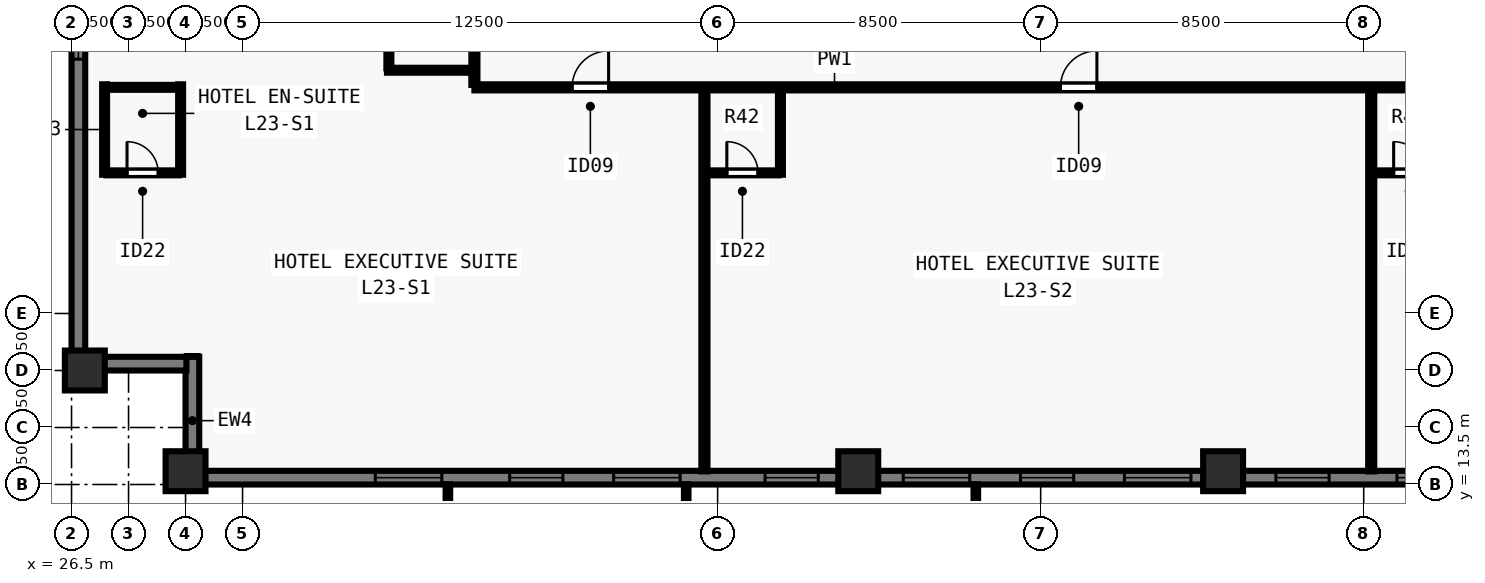
"""IFC4 building model, lengths in metres.
Left out: names, types, materials, properties, quantities, classifications, styles, units other than length and angle.
Written with IfcOpenShell. Run it as: python <this file> out.ifc"""

import sys

from ifc_helpers import new_model, si_unit, direction, frame, frame_2d, origin, origin_2d, place, context, subcontext, project, spatial, rectangle, extrude, element, fill, save


model = new_model("IFC4")
c1 = context("Model", 3, precision=1e-05, world=origin(), true_north=direction((0.0, 1.0)))
c2 = subcontext(c1, "Body", "Model", "MODEL_VIEW")
j1 = project(units=[si_unit("LENGTHUNIT", "METRE"), si_unit("PLANEANGLEUNIT", "RADIAN")], contexts=[c1])
p1 = place(None, origin())
s1 = spatial("IfcSite", under=j1, at=p1, CompositionType="ELEMENT")
p2 = place(p1, origin())
s2 = spatial("IfcBuilding", under=s1, at=p2, CompositionType="ELEMENT")
p3 = place(p2, frame((0.0, 0.0, 86.5)))
s3 = spatial("IfcBuildingStorey", under=s2, at=p3, CompositionType="ELEMENT", Elevation=86.5)
for number, where, z_axis, x_axis in (
    (1, (29.5, 13.85, 0.0), (0.0, 0.0, 1.0), (1.0, 0.0, 0.0)),
    (2, (47.2, 13.85, 0.0), (0.0, 0.0, 1.0), (1.0, 0.0, 0.0)),
    (3, (56.8, 13.85, 0.0), (0.0, 0.0, 1.0), (1.0, 0.0, 0.0)),
    (4, (26.85, 16.5, 0.0), (0.0, 0.0, 1.0), (0.0, 1.0, 0.0)),
):
    element("IfcColumn", number, at=place(p3, frame(where, z_axis=z_axis, x_axis=x_axis)), inside=s3, PredefinedType="COLUMN", context=c2, shape_type="SweptSolid", body=[
        extrude(rectangle(XDim=1.05, YDim=1.05, at=origin_2d()), origin(), (0.0, 0.0, 1.0), 3.5),
    ])
p4 = place(p3, frame((74.5, 13.68, 0.0), z_axis=(0.0, 0.0, 1.0), x_axis=(-1.0, 0.0, 0.0)))
e5 = element("IfcWall", 5, at=p4, inside=s3, PredefinedType="SOLIDWALL", context=c2, shape_type="SweptSolid", body=[
    extrude(rectangle(XDim=44.662, YDim=0.36, at=frame_2d((22.331, 0.0))), origin(), (0.0, 0.0, 1.0), 3.28),
])
p5 = place(p4, frame((4.655, 0.0, 0.8)))
e6 = element("IfcOpeningElement", 6, at=p5, cuts=e5, PredefinedType="OPENING", context=c2, shape_type="SweptSolid", body=[
    extrude(rectangle(XDim=1.75, YDim=1.544, at=frame_2d((0.875, 0.772))), frame((0.0, 0.19, 0.0), z_axis=(0.0, -1.0, 0.0), x_axis=(1.0, 0.0, 0.0)), (0.0, 0.0, 1.0), 0.38),
])
p6 = place(p4, frame((8.19, 0.0, 0.8)))
e7 = element("IfcOpeningElement", 7, at=p6, cuts=e5, PredefinedType="OPENING", context=c2, shape_type="SweptSolid", body=[
    extrude(rectangle(XDim=1.4, YDim=1.544, at=frame_2d((0.7, 0.772))), frame((0.0, 0.19, 0.0), z_axis=(0.0, -1.0, 0.0), x_axis=(1.0, 0.0, 0.0)), (0.0, 0.0, 1.0), 0.38),
])
p7 = place(p4, frame((11.375, 0.0, 0.8)))
e8 = element("IfcOpeningElement", 8, at=p7, cuts=e5, PredefinedType="OPENING", context=c2, shape_type="SweptSolid", body=[
    extrude(rectangle(XDim=1.75, YDim=1.544, at=frame_2d((0.875, 0.772))), frame((0.0, 0.19, 0.0), z_axis=(0.0, -1.0, 0.0), x_axis=(1.0, 0.0, 0.0)), (0.0, 0.0, 1.0), 0.38),
])
p8 = place(p4, frame((14.911, 0.0, 0.8)))
e9 = element("IfcOpeningElement", 9, at=p8, cuts=e5, PredefinedType="OPENING", context=c2, shape_type="SweptSolid", body=[
    extrude(rectangle(XDim=1.4, YDim=1.544, at=frame_2d((0.7, 0.772))), frame((0.0, 0.19, 0.0), z_axis=(0.0, -1.0, 0.0), x_axis=(1.0, 0.0, 0.0)), (0.0, 0.0, 1.0), 0.38),
])
p9 = place(p4, frame((18.546, 0.0, 0.8)))
e10 = element("IfcOpeningElement", 10, at=p9, cuts=e5, PredefinedType="OPENING", context=c2, shape_type="SweptSolid", body=[
    extrude(rectangle(XDim=1.75, YDim=1.544, at=frame_2d((0.875, 0.772))), frame((0.0, 0.19, 0.0), z_axis=(0.0, -1.0, 0.0), x_axis=(1.0, 0.0, 0.0)), (0.0, 0.0, 1.0), 0.38),
])
p10 = place(p4, frame((21.631, 0.0, 0.8)))
e11 = element("IfcOpeningElement", 11, at=p10, cuts=e5, PredefinedType="OPENING", context=c2, shape_type="SweptSolid", body=[
    extrude(rectangle(XDim=1.4, YDim=1.544, at=frame_2d((0.7, 0.772))), frame((0.0, 0.19, 0.0), z_axis=(0.0, -1.0, 0.0), x_axis=(1.0, 0.0, 0.0)), (0.0, 0.0, 1.0), 0.38),
])
p11 = place(p4, frame((24.366, 0.0, 0.8)))
e12 = element("IfcOpeningElement", 12, at=p11, cuts=e5, PredefinedType="OPENING", context=c2, shape_type="SweptSolid", body=[
    extrude(rectangle(XDim=1.75, YDim=1.544, at=frame_2d((0.875, 0.772))), frame((0.0, 0.19, 0.0), z_axis=(0.0, -1.0, 0.0), x_axis=(1.0, 0.0, 0.0)), (0.0, 0.0, 1.0), 0.38),
])
p12 = place(p4, frame((28.351, 0.0, 0.8)))
e13 = element("IfcOpeningElement", 13, at=p12, cuts=e5, PredefinedType="OPENING", context=c2, shape_type="SweptSolid", body=[
    extrude(rectangle(XDim=1.4, YDim=1.544, at=frame_2d((0.7, 0.772))), frame((0.0, 0.19, 0.0), z_axis=(0.0, -1.0, 0.0), x_axis=(1.0, 0.0, 0.0)), (0.0, 0.0, 1.0), 0.38),
])
p13 = place(p4, frame((31.987, 0.0, 0.8)))
e14 = element("IfcOpeningElement", 14, at=p13, cuts=e5, PredefinedType="OPENING", context=c2, shape_type="SweptSolid", body=[
    extrude(rectangle(XDim=1.75, YDim=1.544, at=frame_2d((0.875, 0.772))), frame((0.0, 0.19, 0.0), z_axis=(0.0, -1.0, 0.0), x_axis=(1.0, 0.0, 0.0)), (0.0, 0.0, 1.0), 0.38),
])
p14 = place(p4, frame((35.072, 0.0, 0.8)))
e15 = element("IfcOpeningElement", 15, at=p14, cuts=e5, PredefinedType="OPENING", context=c2, shape_type="SweptSolid", body=[
    extrude(rectangle(XDim=1.4, YDim=1.544, at=frame_2d((0.7, 0.772))), frame((0.0, 0.19, 0.0), z_axis=(0.0, -1.0, 0.0), x_axis=(1.0, 0.0, 0.0)), (0.0, 0.0, 1.0), 0.38),
])
p15 = place(p4, frame((38.257, 0.0, 0.8)))
e16 = element("IfcOpeningElement", 16, at=p15, cuts=e5, PredefinedType="OPENING", context=c2, shape_type="SweptSolid", body=[
    extrude(rectangle(XDim=1.75, YDim=1.544, at=frame_2d((0.875, 0.772))), frame((0.0, 0.19, 0.0), z_axis=(0.0, -1.0, 0.0), x_axis=(1.0, 0.0, 0.0)), (0.0, 0.0, 1.0), 0.38),
])
p16 = place(p3, frame((29.68, 13.5, 0.0), z_axis=(0.0, 0.0, 1.0), x_axis=(0.0, 1.0, 0.0)))
e17 = element("IfcWall", 17, at=p16, inside=s3, PredefinedType="SOLIDWALL", context=c2, shape_type="SweptSolid", body=[
    extrude(rectangle(XDim=3.36, YDim=0.36, at=frame_2d((1.68, 0.0))), origin(), (0.0, 0.0, 1.0), 3.28),
])
p17 = place(p3, frame((29.522, 16.68, 0.0), z_axis=(0.0, 0.0, 1.0), x_axis=(-1.0, 0.0, 0.0)))
e18 = element("IfcWall", 18, at=p17, inside=s3, PredefinedType="SOLIDWALL", context=c2, shape_type="SweptSolid", body=[
    extrude(rectangle(XDim=2.684, YDim=0.36, at=frame_2d((1.342, 0.0))), origin(), (0.0, 0.0, 1.0), 3.28),
])
p18 = place(p3, frame((26.68, 16.5, 0.0), z_axis=(0.0, 0.0, 1.0), x_axis=(0.0, 1.0, 0.0)))
e19 = element("IfcWall", 19, at=p18, inside=s3, PredefinedType="SOLIDWALL", context=c2, shape_type="SweptSolid", body=[
    extrude(rectangle(XDim=44.662, YDim=0.36, at=frame_2d((22.331, 0.0))), origin(), (0.0, 0.0, 1.0), 3.28),
])
p19 = place(p18, frame((8.19, 0.0, 0.8)))
e20 = element("IfcOpeningElement", 20, at=p19, cuts=e19, PredefinedType="OPENING", context=c2, shape_type="SweptSolid", body=[
    extrude(rectangle(XDim=1.4, YDim=1.544, at=frame_2d((0.7, 0.772))), frame((0.0, 0.19, 0.0), z_axis=(0.0, -1.0, 0.0), x_axis=(1.0, 0.0, 0.0)), (0.0, 0.0, 1.0), 0.38),
])
p20 = place(p18, frame((11.375, 0.0, 0.8)))
e21 = element("IfcOpeningElement", 21, at=p20, cuts=e19, PredefinedType="OPENING", context=c2, shape_type="SweptSolid", body=[
    extrude(rectangle(XDim=1.75, YDim=1.544, at=frame_2d((0.875, 0.772))), frame((0.0, 0.19, 0.0), z_axis=(0.0, -1.0, 0.0), x_axis=(1.0, 0.0, 0.0)), (0.0, 0.0, 1.0), 0.38),
])
p21 = place(p18, frame((14.911, 0.0, 0.8)))
e22 = element("IfcOpeningElement", 22, at=p21, cuts=e19, PredefinedType="OPENING", context=c2, shape_type="SweptSolid", body=[
    extrude(rectangle(XDim=1.4, YDim=1.544, at=frame_2d((0.7, 0.772))), frame((0.0, 0.19, 0.0), z_axis=(0.0, -1.0, 0.0), x_axis=(1.0, 0.0, 0.0)), (0.0, 0.0, 1.0), 0.38),
])
p22 = place(p18, frame((18.546, 0.0, 0.8)))
e23 = element("IfcOpeningElement", 23, at=p22, cuts=e19, PredefinedType="OPENING", context=c2, shape_type="SweptSolid", body=[
    extrude(rectangle(XDim=1.75, YDim=1.544, at=frame_2d((0.875, 0.772))), frame((0.0, 0.19, 0.0), z_axis=(0.0, -1.0, 0.0), x_axis=(1.0, 0.0, 0.0)), (0.0, 0.0, 1.0), 0.38),
])
p23 = place(p18, frame((22.881, 0.0, 0.8)))
e24 = element("IfcOpeningElement", 24, at=p23, cuts=e19, PredefinedType="OPENING", context=c2, shape_type="SweptSolid", body=[
    extrude(rectangle(XDim=1.4, YDim=1.544, at=frame_2d((0.7, 0.772))), frame((0.0, 0.19, 0.0), z_axis=(0.0, -1.0, 0.0), x_axis=(1.0, 0.0, 0.0)), (0.0, 0.0, 1.0), 0.38),
])
p24 = place(p18, frame((28.351, 0.0, 0.8)))
e25 = element("IfcOpeningElement", 25, at=p24, cuts=e19, PredefinedType="OPENING", context=c2, shape_type="SweptSolid", body=[
    extrude(rectangle(XDim=1.4, YDim=1.544, at=frame_2d((0.7, 0.772))), frame((0.0, 0.19, 0.0), z_axis=(0.0, -1.0, 0.0), x_axis=(1.0, 0.0, 0.0)), (0.0, 0.0, 1.0), 0.38),
])
p25 = place(p18, frame((31.537, 0.0, 0.8)))
e26 = element("IfcOpeningElement", 26, at=p25, cuts=e19, PredefinedType="OPENING", context=c2, shape_type="SweptSolid", body=[
    extrude(rectangle(XDim=1.75, YDim=1.544, at=frame_2d((0.875, 0.772))), frame((0.0, 0.19, 0.0), z_axis=(0.0, -1.0, 0.0), x_axis=(1.0, 0.0, 0.0)), (0.0, 0.0, 1.0), 0.38),
])
p26 = place(p18, frame((35.072, 0.0, 0.8)))
e27 = element("IfcOpeningElement", 27, at=p26, cuts=e19, PredefinedType="OPENING", context=c2, shape_type="SweptSolid", body=[
    extrude(rectangle(XDim=1.4, YDim=1.544, at=frame_2d((0.7, 0.772))), frame((0.0, 0.19, 0.0), z_axis=(0.0, -1.0, 0.0), x_axis=(1.0, 0.0, 0.0)), (0.0, 0.0, 1.0), 0.38),
])
p27 = place(p3, frame((37.1, 23.95, 0.0), z_axis=(0.0, 0.0, 1.0), x_axis=(1.0, 0.0, 0.0)))
e28 = element("IfcWall", 28, at=p27, inside=s3, PredefinedType="PARTITIONING", context=c2, shape_type="SweptSolid", body=[
    extrude(rectangle(XDim=29.8, YDim=0.16, at=frame_2d((14.9, 0.0))), origin(), (0.0, 0.0, 1.0), 3.28),
])
p28 = place(p27, frame((2.571, 0.0, 0.0)))
e29 = element("IfcOpeningElement", 29, at=p28, cuts=e28, PredefinedType="OPENING", context=c2, shape_type="SweptSolid", body=[
    extrude(rectangle(XDim=0.96, YDim=2.15, at=frame_2d((0.48, 1.075))), frame((0.0, 0.09, 0.0), z_axis=(0.0, -1.0, 0.0), x_axis=(1.0, 0.0, 0.0)), (0.0, 0.0, 1.0), 0.18),
])
p29 = place(p27, frame((15.42, 0.0, 0.0)))
e30 = element("IfcOpeningElement", 30, at=p29, cuts=e28, PredefinedType="OPENING", context=c2, shape_type="SweptSolid", body=[
    extrude(rectangle(XDim=0.96, YDim=2.15, at=frame_2d((0.48, 1.075))), frame((0.0, 0.09, 0.0), z_axis=(0.0, -1.0, 0.0), x_axis=(1.0, 0.0, 0.0)), (0.0, 0.0, 1.0), 0.18),
])
p30 = place(p27, frame((27.269, 0.0, 0.0)))
e31 = element("IfcOpeningElement", 31, at=p30, cuts=e28, PredefinedType="OPENING", context=c2, shape_type="SweptSolid", body=[
    extrude(rectangle(XDim=0.96, YDim=2.15, at=frame_2d((0.48, 1.075))), frame((0.0, 0.09, 0.0), z_axis=(0.0, -1.0, 0.0), x_axis=(1.0, 0.0, 0.0)), (0.0, 0.0, 1.0), 0.18),
])
p31 = place(p3, frame((37.1, 24.015, 0.0), z_axis=(0.0, 0.0, 1.0), x_axis=(0.0, 1.0, 0.0)))
e32 = element("IfcWall", 32, at=p31, inside=s3, PredefinedType="PARTITIONING", context=c2, shape_type="SweptSolid", body=[
    extrude(rectangle(XDim=29.97, YDim=0.16, at=frame_2d((14.985, 0.0))), origin(), (0.0, 0.0, 1.0), 3.28),
])
p32 = place(p31, frame((8.134, 0.0, 0.0)))
e33 = element("IfcOpeningElement", 33, at=p32, cuts=e32, PredefinedType="OPENING", context=c2, shape_type="SweptSolid", body=[
    extrude(rectangle(XDim=0.96, YDim=2.15, at=frame_2d((0.48, 1.075))), frame((0.0, 0.09, 0.0), z_axis=(0.0, -1.0, 0.0), x_axis=(1.0, 0.0, 0.0)), (0.0, 0.0, 1.0), 0.18),
])
p33 = place(p31, frame((22.934, 0.0, 0.0)))
e34 = element("IfcOpeningElement", 34, at=p33, cuts=e32, PredefinedType="OPENING", context=c2, shape_type="SweptSolid", body=[
    extrude(rectangle(XDim=0.96, YDim=2.15, at=frame_2d((0.48, 1.075))), frame((0.0, 0.09, 0.0), z_axis=(0.0, -1.0, 0.0), x_axis=(1.0, 0.0, 0.0)), (0.0, 0.0, 1.0), 0.18),
])
for number, where, z_axis, x_axis in (
    (35, (27.37, 21.65, 0.0), (0.0, 0.0, 1.0), (0.0, 1.0, 0.0)),
    (36, (29.37, 21.65, 0.0), (0.0, 0.0, 1.0), (0.0, 1.0, 0.0)),
):
    element("IfcWall", number, at=place(p3, frame(where, z_axis=z_axis, x_axis=x_axis)), inside=s3, PredefinedType="PLUMBINGWALL", context=c2, shape_type="SweptSolid", body=[
        extrude(rectangle(XDim=2.38, YDim=0.13, at=frame_2d((1.19, 0.0))), origin(), (0.0, 0.0, 1.0), 3.28),
    ])
p34 = place(p3, frame((27.42, 21.7, 0.0), z_axis=(0.0, 0.0, 1.0), x_axis=(1.0, 0.0, 0.0)))
e37 = element("IfcWall", 37, at=p34, inside=s3, PredefinedType="PLUMBINGWALL", context=c2, shape_type="SweptSolid", body=[
    extrude(rectangle(XDim=1.9, YDim=0.13, at=frame_2d((0.95, 0.0))), origin(), (0.0, 0.0, 1.0), 3.28),
])
p35 = place(p34, frame((0.54, 0.0, 0.0)))
e38 = element("IfcOpeningElement", 38, at=p35, cuts=e37, PredefinedType="OPENING", context=c2, shape_type="SweptSolid", body=[
    extrude(rectangle(XDim=0.82, YDim=2.1, at=frame_2d((0.41, 1.05))), frame((0.0, 0.075, 0.0), z_axis=(0.0, -1.0, 0.0), x_axis=(1.0, 0.0, 0.0)), (0.0, 0.0, 1.0), 0.15),
])
p36 = place(p3, frame((27.42, 23.95, 0.0), z_axis=(0.0, 0.0, 1.0), x_axis=(1.0, 0.0, 0.0)))
e39 = element("IfcWall", 39, at=p36, inside=s3, PredefinedType="PLUMBINGWALL", context=c2, shape_type="SweptSolid", body=[
    extrude(rectangle(XDim=1.9, YDim=0.13, at=frame_2d((0.95, 0.0))), origin(), (0.0, 0.0, 1.0), 3.28),
])
p37 = place(p3, frame((43.153, 13.845, 0.0), z_axis=(0.0, 0.0, 1.0), x_axis=(0.0, 1.0, 0.0)))
e40 = element("IfcWall", 40, at=p37, inside=s3, PredefinedType="PARTITIONING", context=c2, shape_type="SweptSolid", body=[
    extrude(rectangle(XDim=10.04, YDim=0.16, at=frame_2d((5.02, 0.0))), origin(), (0.0, 0.0, 1.0), 3.28),
])
p38 = place(p3, frame((45.153, 21.65, 0.0), z_axis=(0.0, 0.0, 1.0), x_axis=(0.0, 1.0, 0.0)))
e41 = element("IfcWall", 41, at=p38, inside=s3, PredefinedType="PLUMBINGWALL", context=c2, shape_type="SweptSolid", body=[
    extrude(rectangle(XDim=2.235, YDim=0.13, at=frame_2d((1.118, 0.0))), origin(), (0.0, 0.0, 1.0), 3.28),
])
p39 = place(p3, frame((43.218, 21.7, 0.0), z_axis=(0.0, 0.0, 1.0), x_axis=(1.0, 0.0, 0.0)))
e42 = element("IfcWall", 42, at=p39, inside=s3, PredefinedType="PLUMBINGWALL", context=c2, shape_type="SweptSolid", body=[
    extrude(rectangle(XDim=1.885, YDim=0.13, at=frame_2d((0.942, 0.0))), origin(), (0.0, 0.0, 1.0), 3.28),
])
p40 = place(p39, frame((0.525, 0.0, 0.0)))
e43 = element("IfcOpeningElement", 43, at=p40, cuts=e42, PredefinedType="OPENING", context=c2, shape_type="SweptSolid", body=[
    extrude(rectangle(XDim=0.82, YDim=2.1, at=frame_2d((0.41, 1.05))), frame((0.0, 0.075, 0.0), z_axis=(0.0, -1.0, 0.0), x_axis=(1.0, 0.0, 0.0)), (0.0, 0.0, 1.0), 0.15),
])
p41 = place(p3, frame((60.698, 13.845, 0.0), z_axis=(0.0, 0.0, 1.0), x_axis=(0.0, 1.0, 0.0)))
e44 = element("IfcWall", 44, at=p41, inside=s3, PredefinedType="PARTITIONING", context=c2, shape_type="SweptSolid", body=[
    extrude(rectangle(XDim=10.04, YDim=0.16, at=frame_2d((5.02, 0.0))), origin(), (0.0, 0.0, 1.0), 3.28),
])
p42 = place(p3, frame((60.762, 21.7, 0.0), z_axis=(0.0, 0.0, 1.0), x_axis=(1.0, 0.0, 0.0)))
e45 = element("IfcWall", 45, at=p42, inside=s3, PredefinedType="PLUMBINGWALL", context=c2, shape_type="SweptSolid", body=[
    extrude(rectangle(XDim=1.885, YDim=0.13, at=frame_2d((0.942, 0.0))), origin(), (0.0, 0.0, 1.0), 3.28),
])
p43 = place(p42, frame((0.525, 0.0, 0.0)))
e46 = element("IfcOpeningElement", 46, at=p43, cuts=e45, PredefinedType="OPENING", context=c2, shape_type="SweptSolid", body=[
    extrude(rectangle(XDim=0.82, YDim=2.1, at=frame_2d((0.41, 1.05))), frame((0.0, 0.075, 0.0), z_axis=(0.0, -1.0, 0.0), x_axis=(1.0, 0.0, 0.0)), (0.0, 0.0, 1.0), 0.15),
])
p44 = place(p3, frame((34.8, 24.4, 0.0), z_axis=(0.0, 0.0, 1.0), x_axis=(1.0, 0.0, 0.0)))
e47 = element("IfcWall", 47, at=p44, inside=s3, PredefinedType="PLUMBINGWALL", context=c2, shape_type="SweptSolid", body=[
    extrude(rectangle(XDim=2.235, YDim=0.13, at=frame_2d((1.117, 0.0))), origin(), (0.0, 0.0, 1.0), 2.849),
])
p45 = place(p3, frame((34.85, 24.45, 0.0), z_axis=(0.0, 0.0, 1.0), x_axis=(0.0, 1.0, 0.0)))
e48 = element("IfcWall", 48, at=p45, inside=s3, PredefinedType="PLUMBINGWALL", context=c2, shape_type="SweptSolid", body=[
    extrude(rectangle(XDim=1.9, YDim=0.13, at=frame_2d((0.95, 0.0))), origin(), (0.0, 0.0, 1.0), 3.28),
])
p46 = place(p45, frame((0.54, 0.0, 0.0)))
e49 = element("IfcOpeningElement", 49, at=p46, cuts=e48, PredefinedType="OPENING", context=c2, shape_type="SweptSolid", body=[
    extrude(rectangle(XDim=0.82, YDim=2.1, at=frame_2d((0.41, 1.05))), frame((0.0, 0.075, 0.0), z_axis=(0.0, -1.0, 0.0), x_axis=(1.0, 0.0, 0.0)), (0.0, 0.0, 1.0), 0.15),
])
p47 = place(p7, origin())
e50 = element("IfcWindow", 50, at=p47, inside=s3, PartitioningType="SINGLE_PANEL", PredefinedType="WINDOW", context=c2, shape_type="SweptSolid", body=[
    extrude(rectangle(XDim=1.75, YDim=1.544, at=frame_2d((0.875, 0.772))), frame((0.0, -0.05, 0.0), z_axis=(0.0, -1.0, 0.0), x_axis=(1.0, 0.0, 0.0)), (0.0, 0.0, 1.0), 0.06),
])
fill(e8, e50)
p48 = place(p8, origin())
e51 = element("IfcWindow", 51, at=p48, inside=s3, PartitioningType="SINGLE_PANEL", PredefinedType="WINDOW", context=c2, shape_type="SweptSolid", body=[
    extrude(rectangle(XDim=1.4, YDim=1.544, at=frame_2d((0.7, 0.772))), frame((0.0, -0.05, 0.0), z_axis=(0.0, -1.0, 0.0), x_axis=(1.0, 0.0, 0.0)), (0.0, 0.0, 1.0), 0.06),
])
fill(e9, e51)
p49 = place(p9, origin())
e52 = element("IfcWindow", 52, at=p49, inside=s3, PartitioningType="SINGLE_PANEL", PredefinedType="WINDOW", context=c2, shape_type="SweptSolid", body=[
    extrude(rectangle(XDim=1.75, YDim=1.544, at=frame_2d((0.875, 0.772))), frame((0.0, -0.05, 0.0), z_axis=(0.0, -1.0, 0.0), x_axis=(1.0, 0.0, 0.0)), (0.0, 0.0, 1.0), 0.06),
])
fill(e10, e52)
p50 = place(p10, origin())
e53 = element("IfcWindow", 53, at=p50, inside=s3, PartitioningType="SINGLE_PANEL", PredefinedType="WINDOW", context=c2, shape_type="SweptSolid", body=[
    extrude(rectangle(XDim=1.4, YDim=1.544, at=frame_2d((0.7, 0.772))), frame((0.0, -0.05, 0.0), z_axis=(0.0, -1.0, 0.0), x_axis=(1.0, 0.0, 0.0)), (0.0, 0.0, 1.0), 0.06),
])
fill(e11, e53)
p51 = place(p11, origin())
e54 = element("IfcWindow", 54, at=p51, inside=s3, PartitioningType="SINGLE_PANEL", PredefinedType="WINDOW", context=c2, shape_type="SweptSolid", body=[
    extrude(rectangle(XDim=1.75, YDim=1.544, at=frame_2d((0.875, 0.772))), frame((0.0, -0.05, 0.0), z_axis=(0.0, -1.0, 0.0), x_axis=(1.0, 0.0, 0.0)), (0.0, 0.0, 1.0), 0.06),
])
fill(e12, e54)
p52 = place(p12, origin())
e55 = element("IfcWindow", 55, at=p52, inside=s3, PartitioningType="SINGLE_PANEL", PredefinedType="WINDOW", context=c2, shape_type="SweptSolid", body=[
    extrude(rectangle(XDim=1.4, YDim=1.544, at=frame_2d((0.7, 0.772))), frame((0.0, -0.05, 0.0), z_axis=(0.0, -1.0, 0.0), x_axis=(1.0, 0.0, 0.0)), (0.0, 0.0, 1.0), 0.06),
])
fill(e13, e55)
p53 = place(p13, origin())
e56 = element("IfcWindow", 56, at=p53, inside=s3, PartitioningType="SINGLE_PANEL", PredefinedType="WINDOW", context=c2, shape_type="SweptSolid", body=[
    extrude(rectangle(XDim=1.75, YDim=1.544, at=frame_2d((0.875, 0.772))), frame((0.0, -0.05, 0.0), z_axis=(0.0, -1.0, 0.0), x_axis=(1.0, 0.0, 0.0)), (0.0, 0.0, 1.0), 0.06),
])
fill(e14, e56)
p54 = place(p14, origin())
e57 = element("IfcWindow", 57, at=p54, inside=s3, PartitioningType="SINGLE_PANEL", PredefinedType="WINDOW", context=c2, shape_type="SweptSolid", body=[
    extrude(rectangle(XDim=1.4, YDim=1.544, at=frame_2d((0.7, 0.772))), frame((0.0, -0.05, 0.0), z_axis=(0.0, -1.0, 0.0), x_axis=(1.0, 0.0, 0.0)), (0.0, 0.0, 1.0), 0.06),
])
fill(e15, e57)
p55 = place(p15, origin())
e58 = element("IfcWindow", 58, at=p55, inside=s3, PartitioningType="SINGLE_PANEL", PredefinedType="WINDOW", context=c2, shape_type="SweptSolid", body=[
    extrude(rectangle(XDim=1.75, YDim=1.544, at=frame_2d((0.875, 0.772))), frame((0.0, -0.05, 0.0), z_axis=(0.0, -1.0, 0.0), x_axis=(1.0, 0.0, 0.0)), (0.0, 0.0, 1.0), 0.06),
])
fill(e16, e58)
p56 = place(p19, origin())
e59 = element("IfcWindow", 59, at=p56, inside=s3, PartitioningType="SINGLE_PANEL", PredefinedType="WINDOW", context=c2, shape_type="SweptSolid", body=[
    extrude(rectangle(XDim=1.4, YDim=1.544, at=frame_2d((0.7, 0.772))), frame((0.0, -0.05, 0.0), z_axis=(0.0, -1.0, 0.0), x_axis=(1.0, 0.0, 0.0)), (0.0, 0.0, 1.0), 0.06),
])
fill(e20, e59)
p57 = place(p35, origin())
e60 = element("IfcDoor", 60, at=p57, inside=s3, OperationType="SINGLE_SWING_LEFT", PredefinedType="DOOR", context=c2, shape_type="SweptSolid", body=[
    extrude(rectangle(XDim=0.82, YDim=2.1, at=frame_2d((0.41, 1.05))), frame((0.0, 0.025, 0.0), z_axis=(0.0, -1.0, 0.0), x_axis=(1.0, 0.0, 0.0)), (0.0, 0.0, 1.0), 0.05),
])
fill(e38, e60)
p58 = place(p28, origin())
e61 = element("IfcDoor", 61, at=p58, inside=s3, OperationType="SINGLE_SWING_RIGHT", PredefinedType="DOOR", context=c2, shape_type="SweptSolid", body=[
    extrude(rectangle(XDim=0.96, YDim=2.15, at=frame_2d((0.48, 1.075))), frame((0.0, 0.025, 0.0), z_axis=(0.0, -1.0, 0.0), x_axis=(1.0, 0.0, 0.0)), (0.0, 0.0, 1.0), 0.05),
])
fill(e29, e61)
p59 = place(p40, origin())
e62 = element("IfcDoor", 62, at=p59, inside=s3, OperationType="SINGLE_SWING_LEFT", PredefinedType="DOOR", context=c2, shape_type="SweptSolid", body=[
    extrude(rectangle(XDim=0.82, YDim=2.1, at=frame_2d((0.41, 1.05))), frame((0.0, 0.025, 0.0), z_axis=(0.0, -1.0, 0.0), x_axis=(1.0, 0.0, 0.0)), (0.0, 0.0, 1.0), 0.05),
])
fill(e43, e62)
p60 = place(p29, origin())
e63 = element("IfcDoor", 63, at=p60, inside=s3, OperationType="SINGLE_SWING_RIGHT", PredefinedType="DOOR", context=c2, shape_type="SweptSolid", body=[
    extrude(rectangle(XDim=0.96, YDim=2.15, at=frame_2d((0.48, 1.075))), frame((0.0, 0.025, 0.0), z_axis=(0.0, -1.0, 0.0), x_axis=(1.0, 0.0, 0.0)), (0.0, 0.0, 1.0), 0.05),
])
fill(e30, e63)
p61 = place(p43, origin())
e64 = element("IfcDoor", 64, at=p61, inside=s3, OperationType="SINGLE_SWING_LEFT", PredefinedType="DOOR", context=c2, shape_type="SweptSolid", body=[
    extrude(rectangle(XDim=0.82, YDim=2.1, at=frame_2d((0.41, 1.05))), frame((0.0, 0.025, 0.0), z_axis=(0.0, -1.0, 0.0), x_axis=(1.0, 0.0, 0.0)), (0.0, 0.0, 1.0), 0.05),
])
fill(e46, e64)
save(model, sys.argv[1])
